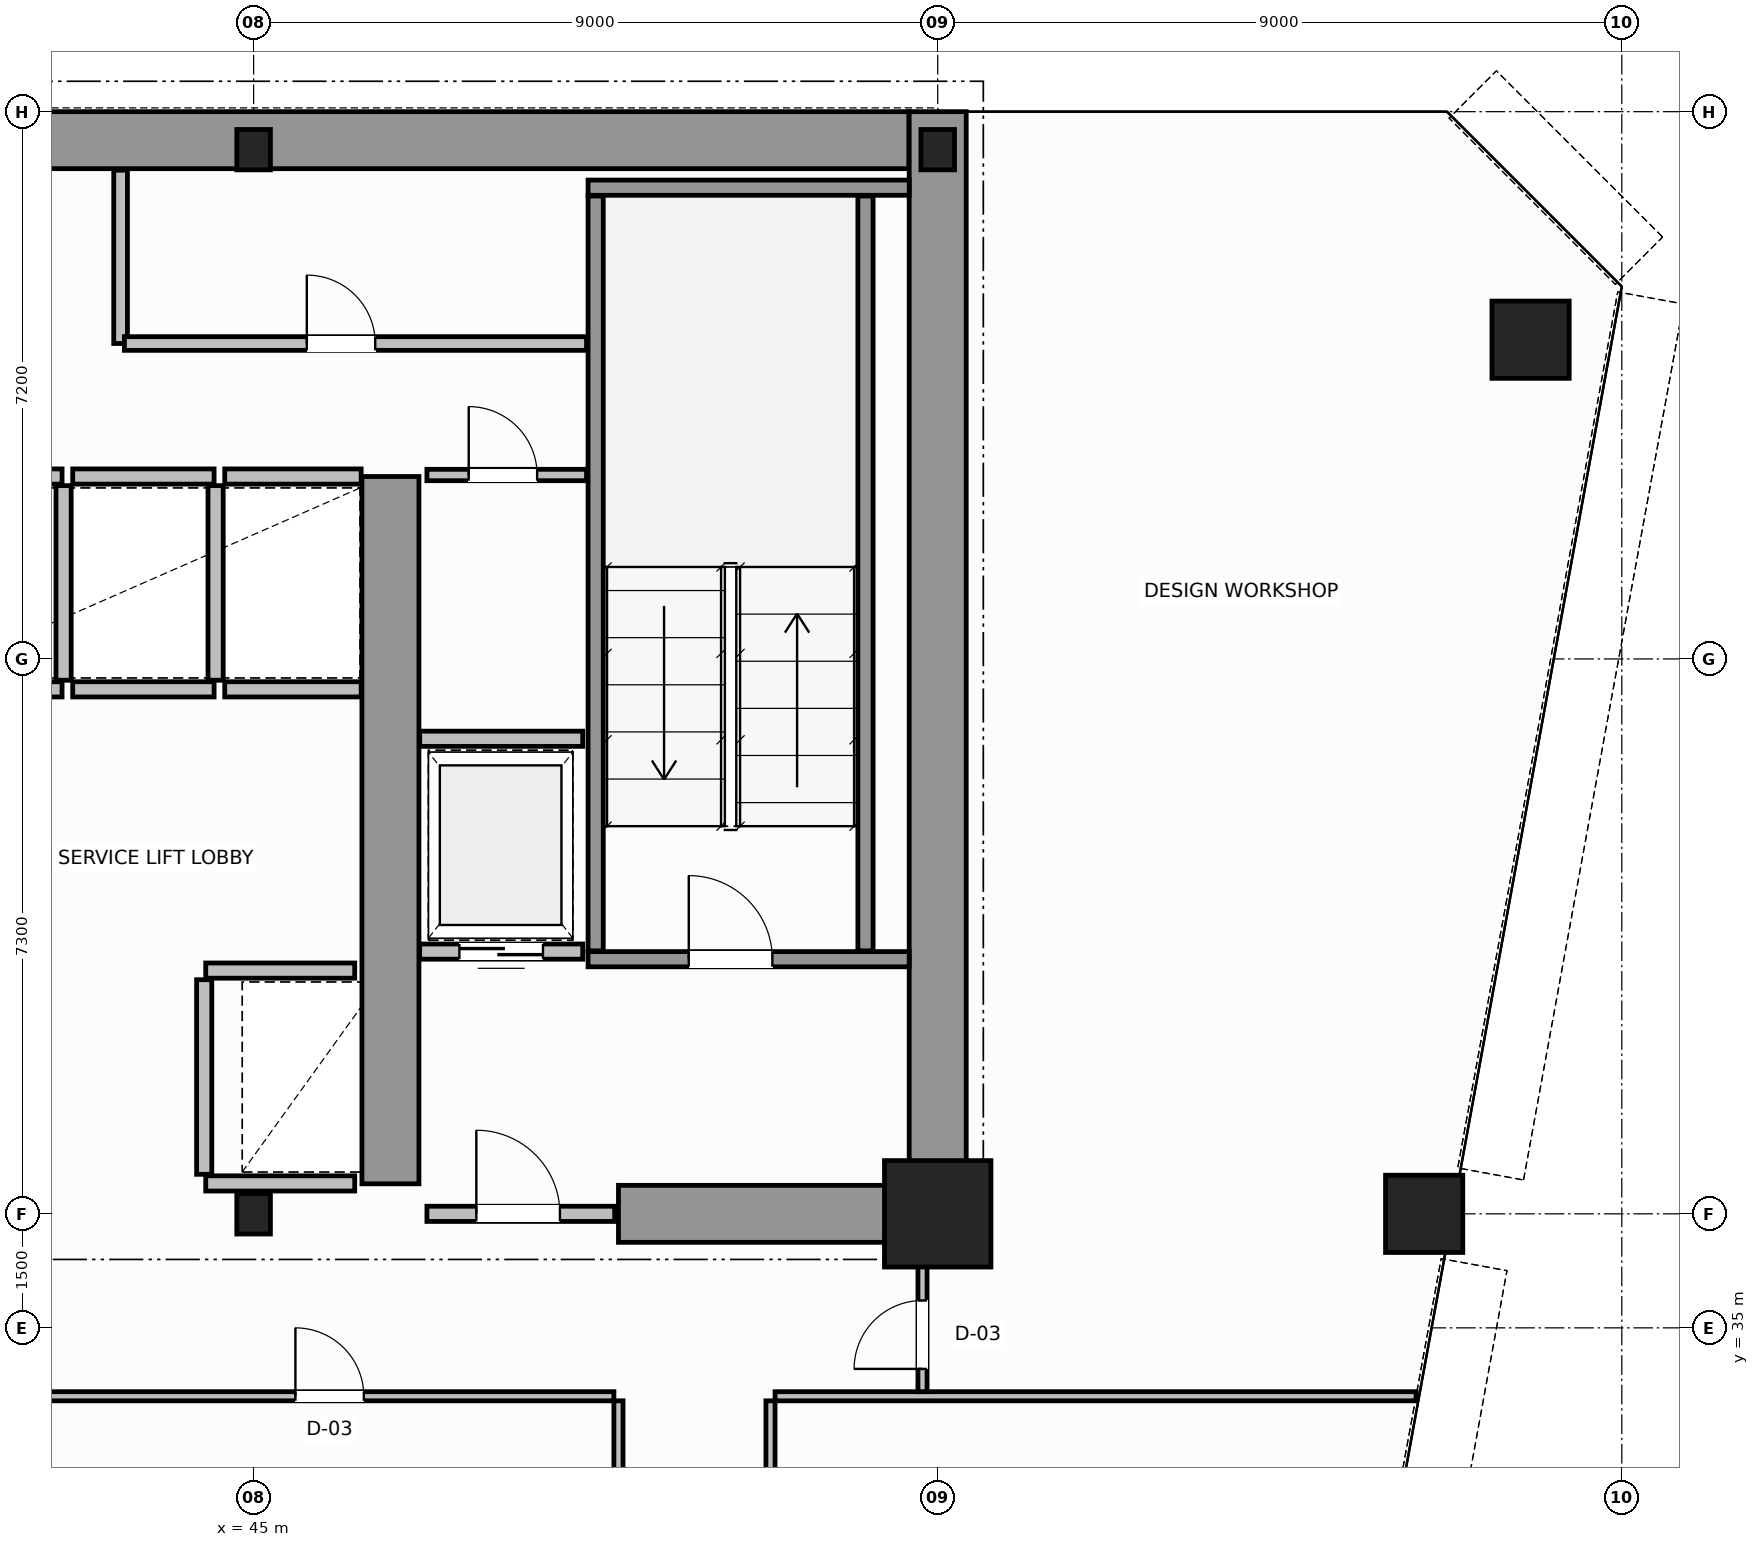
"""IFC4 building model, lengths in metres.
Left out: names, types, materials, properties, quantities, classifications, styles, units other than length and angle.
Written with IfcOpenShell. Run it as: python <this file> out.ifc"""

import sys

from ifc_helpers import new_model, si_unit, direction, frame, frame_2d, origin, origin_2d, place, context, subcontext, project, spatial, rectangle, hollow_circle, i_section, extrude, source, transform, mapped, element, fill, save


model = new_model("IFC4")
c1 = context("Model", 3, precision=1e-05, world=origin(), true_north=direction((0.0, 1.0)))
c2 = subcontext(c1, "Body", "Model", "MODEL_VIEW")
j1 = project(units=[si_unit("LENGTHUNIT", "METRE"), si_unit("PLANEANGLEUNIT", "RADIAN")], contexts=[c1])
p1 = place(None, origin())
s1 = spatial("IfcSite", under=j1, at=p1, CompositionType="ELEMENT")
p2 = place(p1, origin())
s2 = spatial("IfcBuilding", under=s1, at=p2, CompositionType="ELEMENT")
p3 = place(p2, frame((0.0, 0.0, 92.0)))
s3 = spatial("IfcBuildingStorey", under=s2, at=p3, CompositionType="ELEMENT", Elevation=92.0)
m1 = source(origin(), c2, "Body", "SweptSolid", [
    extrude(i_section(OverallWidth=0.442, OverallDepth=0.531, WebThickness=0.065, FlangeThickness=0.076, FilletRadius=0.015, at=origin_2d()), origin(), (0.0, 0.0, 1.0), 3.8),
])
p4 = place(p3, frame((45.0, 36.5, 0.0), z_axis=(0.0, 0.0, 1.0), x_axis=(1.0, 0.0, 0.0)))
e1 = element("IfcColumn", 1, at=p4, inside=s3, PredefinedType="COLUMN", context=c2, shape_type="MappedRepresentation", body=[
    mapped(m1, transform((0.0, 0.0, 0.0), scale=1.0)),
])
m2 = source(origin(), c2, "Body", "SweptSolid", [
    extrude(rectangle(XDim=1.4, YDim=1.4, at=origin_2d()), origin(), (0.0, 0.0, 1.0), 3.8),
])
p5 = place(p3, frame((54.0, 36.5, 0.0), z_axis=(0.0, 0.0, 1.0), x_axis=(1.0, 0.0, 0.0)))
e2 = element("IfcColumn", 2, at=p5, inside=s3, PredefinedType="COLUMN", context=c2, shape_type="MappedRepresentation", body=[
    mapped(m2, transform((0.0, 0.0, 0.0), scale=1.0)),
])
for number, where, z_axis, x_axis in (
    (3, (45.0, 50.5, 0.0), (0.0, 0.0, 1.0), (1.0, 0.0, 0.0)),
    (4, (54.0, 50.5, 0.0), (0.0, 0.0, 1.0), (1.0, 0.0, 0.0)),
):
    element("IfcColumn", number, at=place(p3, frame(where, z_axis=z_axis, x_axis=x_axis)), inside=s3, PredefinedType="COLUMN", context=c2, shape_type="MappedRepresentation", body=[
        mapped(m1, transform((0.0, 0.0, 0.0), scale=1.0)),
    ])
m3 = source(origin(), c2, "Body", "SweptSolid", [
    extrude(hollow_circle(Radius=0.508, WallThickness=0.045, at=origin_2d()), origin(), (0.0, 0.0, 1.0), 3.8),
])
for number, where, z_axis, x_axis in (
    (5, (61.8, 48.0, 0.0), (0.0, 0.0, 1.0), (1.0, 0.0, 0.0)),
    (6, (60.4, 36.5, 0.0), (0.0, 0.0, 1.0), (1.0, 0.0, 0.0)),
):
    element("IfcColumn", number, at=place(p3, frame(where, z_axis=z_axis, x_axis=x_axis)), inside=s3, PredefinedType="COLUMN", context=c2, shape_type="MappedRepresentation", body=[
        mapped(m3, transform((0.0, 0.0, 0.0), scale=1.0)),
    ])
p6 = place(p3, frame((34.002, 50.625, 0.0), z_axis=(0.0, 0.0, 1.0), x_axis=(1.0, 0.0, 0.0)))
e7 = element("IfcWall", 7, at=p6, inside=s3, PredefinedType="SHEAR", context=c2, shape_type="SweptSolid", body=[
    extrude(rectangle(XDim=19.619, YDim=0.75, at=frame_2d((9.81, 0.0))), origin(), (0.0, 0.0, 1.0), 3.8),
])
p7 = place(p3, frame((54.0, 36.5, 0.0), z_axis=(0.0, 0.0, 1.0), x_axis=(0.0, 1.0, 0.0)))
e8 = element("IfcWall", 8, at=p7, inside=s3, PredefinedType="SHEAR", context=c2, shape_type="SweptSolid", body=[
    extrude(rectangle(XDim=14.5, YDim=0.75, at=frame_2d((7.25, 0.0))), origin(), (0.0, 0.0, 1.0), 3.8),
])
p8 = place(p3, frame((49.8, 36.5, 0.0), z_axis=(0.0, 0.0, 1.0), x_axis=(1.0, 0.0, 0.0)))
e9 = element("IfcWall", 9, at=p8, inside=s3, PredefinedType="SHEAR", context=c2, shape_type="SweptSolid", body=[
    extrude(rectangle(XDim=3.805, YDim=0.75, at=frame_2d((1.902, 0.0))), origin(), (0.0, 0.0, 1.0), 2.38),
])
p9 = place(p3, frame((46.8, 36.895, 0.0), z_axis=(0.0, 0.0, 1.0), x_axis=(0.0, 1.0, 0.0)))
e10 = element("IfcWall", 10, at=p9, inside=s3, PredefinedType="SHEAR", context=c2, shape_type="SweptSolid", body=[
    extrude(rectangle(XDim=9.305, YDim=0.75, at=frame_2d((4.652, 0.0))), origin(), (0.0, 0.0, 1.0), 3.8),
])
p10 = place(p3, frame((49.4, 39.85, 0.0), z_axis=(0.0, 0.0, 1.0), x_axis=(1.0, 0.0, 0.0)))
e11 = element("IfcWall", 11, at=p10, inside=s3, PredefinedType="SOLIDWALL", context=c2, shape_type="SweptSolid", body=[
    extrude(rectangle(XDim=4.225, YDim=0.2, at=frame_2d((2.113, 0.0))), origin(), (0.0, 0.0, 1.0), 3.8),
])
p11 = place(p10, frame((1.325, 0.0, 0.0)))
e12 = element("IfcOpeningElement", 12, at=p11, cuts=e11, PredefinedType="OPENING", context=c2, shape_type="SweptSolid", body=[
    extrude(rectangle(XDim=1.1, YDim=2.15, at=frame_2d((0.55, 1.075))), frame((0.0, 0.11, 0.0), z_axis=(0.0, -1.0, 0.0), x_axis=(1.0, 0.0, 0.0)), (0.0, 0.0, 1.0), 0.22),
])
p12 = place(p3, frame((49.4, 50.0, 0.0), z_axis=(0.0, 0.0, 1.0), x_axis=(1.0, 0.0, 0.0)))
e13 = element("IfcWall", 13, at=p12, inside=s3, PredefinedType="SOLIDWALL", context=c2, shape_type="SweptSolid", body=[
    extrude(rectangle(XDim=4.225, YDim=0.2, at=frame_2d((2.113, 0.0))), origin(), (0.0, 0.0, 1.0), 3.8),
])
for number, where, z_axis, x_axis in (
    (14, (49.5, 39.96, 0.0), (0.0, 0.0, 1.0), (0.0, 1.0, 0.0)),
    (15, (53.05, 39.96, 0.0), (0.0, 0.0, 1.0), (0.0, 1.0, 0.0)),
):
    element("IfcWall", number, at=place(p3, frame(where, z_axis=z_axis, x_axis=x_axis)), inside=s3, PredefinedType="SOLIDWALL", context=c2, shape_type="SweptSolid", body=[
        extrude(rectangle(XDim=9.93, YDim=0.2, at=frame_2d((4.965, 0.0))), origin(), (0.0, 0.0, 1.0), 3.8),
    ])
p13 = place(p3, frame((47.28, 36.5, 0.0), z_axis=(0.0, 0.0, 1.0), x_axis=(1.0, 0.0, 0.0)))
e16 = element("IfcWall", 16, at=p13, inside=s3, PredefinedType="SOLIDWALL", context=c2, shape_type="SweptSolid", body=[
    extrude(rectangle(XDim=2.47, YDim=0.2, at=frame_2d((1.235, 0.0))), origin(), (0.0, 0.0, 1.0), 2.37),
])
p14 = place(p13, frame((0.65, 0.0, 0.0)))
e17 = element("IfcOpeningElement", 17, at=p14, cuts=e16, PredefinedType="OPENING", context=c2, shape_type="SweptSolid", body=[
    extrude(rectangle(XDim=1.1, YDim=2.15, at=frame_2d((0.55, 1.075))), frame((0.0, 0.11, 0.0), z_axis=(0.0, -1.0, 0.0), x_axis=(1.0, 0.0, 0.0)), (0.0, 0.0, 1.0), 0.22),
])
p15 = place(p3, frame((44.37, 39.7, 0.0), z_axis=(0.0, 0.0, 1.0), x_axis=(1.0, 0.0, 0.0)))
e18 = element("IfcWall", 18, at=p15, inside=s3, PredefinedType="SOLIDWALL", context=c2, shape_type="SweptSolid", body=[
    extrude(rectangle(XDim=1.96, YDim=0.2, at=frame_2d((0.98, 0.0))), origin(), (0.0, 0.0, 1.0), 3.58),
])
p16 = place(p3, frame((44.37, 36.9, 0.0), z_axis=(0.0, 0.0, 1.0), x_axis=(1.0, 0.0, 0.0)))
e19 = element("IfcWall", 19, at=p16, inside=s3, PredefinedType="SOLIDWALL", context=c2, shape_type="SweptSolid", body=[
    extrude(rectangle(XDim=1.96, YDim=0.2, at=frame_2d((0.98, 0.0))), origin(), (0.0, 0.0, 1.0), 2.37),
])
p17 = place(p3, frame((44.35, 37.02, 0.0), z_axis=(0.0, 0.0, 1.0), x_axis=(0.0, 1.0, 0.0)))
e20 = element("IfcWall", 20, at=p17, inside=s3, PredefinedType="SOLIDWALL", context=c2, shape_type="SweptSolid", body=[
    extrude(rectangle(XDim=2.56, YDim=0.2, at=frame_2d((1.28, 0.0))), origin(), (0.0, 0.0, 1.0), 3.58),
])
for number, where, z_axis, x_axis in (
    (21, (40.62, 43.4, 0.0), (0.0, 0.0, 1.0), (1.0, 0.0, 0.0)),
    (22, (40.62, 46.2, 0.0), (0.0, 0.0, 1.0), (1.0, 0.0, 0.0)),
):
    element("IfcWall", number, at=place(p3, frame(where, z_axis=z_axis, x_axis=x_axis)), inside=s3, PredefinedType="SOLIDWALL", context=c2, shape_type="SweptSolid", body=[
        extrude(rectangle(XDim=1.86, YDim=0.2, at=frame_2d((0.93, 0.0))), origin(), (0.0, 0.0, 1.0), 3.58),
    ])
p18 = place(p3, frame((42.5, 43.52, 0.0), z_axis=(0.0, 0.0, 1.0), x_axis=(0.0, 1.0, 0.0)))
e23 = element("IfcWall", 23, at=p18, inside=s3, PredefinedType="SOLIDWALL", context=c2, shape_type="SweptSolid", body=[
    extrude(rectangle(XDim=2.56, YDim=0.2, at=frame_2d((1.28, 0.0))), origin(), (0.0, 0.0, 1.0), 3.58),
])
for number, where, z_axis, x_axis in (
    (24, (42.62, 43.4, 0.0), (0.0, 0.0, 1.0), (1.0, 0.0, 0.0)),
    (25, (42.62, 46.2, 0.0), (0.0, 0.0, 1.0), (1.0, 0.0, 0.0)),
):
    element("IfcWall", number, at=place(p3, frame(where, z_axis=z_axis, x_axis=x_axis)), inside=s3, PredefinedType="SOLIDWALL", context=c2, shape_type="SweptSolid", body=[
        extrude(rectangle(XDim=1.86, YDim=0.2, at=frame_2d((0.93, 0.0))), origin(), (0.0, 0.0, 1.0), 3.58),
    ])
p19 = place(p3, frame((44.5, 43.52, 0.0), z_axis=(0.0, 0.0, 1.0), x_axis=(0.0, 1.0, 0.0)))
e26 = element("IfcWall", 26, at=p19, inside=s3, PredefinedType="SOLIDWALL", context=c2, shape_type="SweptSolid", body=[
    extrude(rectangle(XDim=2.56, YDim=0.2, at=frame_2d((1.28, 0.0))), origin(), (0.0, 0.0, 1.0), 3.58),
])
for number, where, z_axis, x_axis in (
    (27, (44.62, 43.4, 0.0), (0.0, 0.0, 1.0), (1.0, 0.0, 0.0)),
    (28, (44.62, 46.2, 0.0), (0.0, 0.0, 1.0), (1.0, 0.0, 0.0)),
):
    element("IfcWall", number, at=place(p3, frame(where, z_axis=z_axis, x_axis=x_axis)), inside=s3, PredefinedType="SOLIDWALL", context=c2, shape_type="SweptSolid", body=[
        extrude(rectangle(XDim=1.795, YDim=0.2, at=frame_2d((0.897, 0.0))), origin(), (0.0, 0.0, 1.0), 3.58),
    ])
p20 = place(p3, frame((47.185, 39.95, 0.0), z_axis=(0.0, 0.0, 1.0), x_axis=(1.0, 0.0, 0.0)))
e29 = element("IfcWall", 29, at=p20, inside=s3, PredefinedType="SOLIDWALL", context=c2, shape_type="SweptSolid", body=[
    extrude(rectangle(XDim=2.145, YDim=0.2, at=frame_2d((1.073, 0.0))), origin(), (0.0, 0.0, 1.0), 3.58),
])
p21 = place(p20, frame((0.522, 0.0, 0.0)))
e30 = element("IfcOpeningElement", 30, at=p21, cuts=e29, PredefinedType="OPENING", context=c2, shape_type="SweptSolid", body=[
    extrude(rectangle(XDim=1.1, YDim=2.15, at=frame_2d((0.55, 1.075))), frame((0.0, 0.11, 0.0), z_axis=(0.0, -1.0, 0.0), x_axis=(1.0, 0.0, 0.0)), (0.0, 0.0, 1.0), 0.22),
])
p22 = place(p3, frame((47.185, 42.75, 0.0), z_axis=(0.0, 0.0, 1.0), x_axis=(1.0, 0.0, 0.0)))
e31 = element("IfcWall", 31, at=p22, inside=s3, PredefinedType="SOLIDWALL", context=c2, shape_type="SweptSolid", body=[
    extrude(rectangle(XDim=2.145, YDim=0.2, at=frame_2d((1.073, 0.0))), origin(), (0.0, 0.0, 1.0), 3.58),
])
p23 = place(p3, frame((47.28, 46.22, 0.0), z_axis=(0.0, 0.0, 1.0), x_axis=(1.0, 0.0, 0.0)))
e32 = element("IfcWall", 32, at=p23, inside=s3, PredefinedType="PARTITIONING", context=c2, shape_type="SweptSolid", body=[
    extrude(rectangle(XDim=2.1, YDim=0.15, at=frame_2d((1.05, 0.0))), origin(), (0.0, 0.0, 1.0), 3.58),
])
p24 = place(p23, frame((0.55, 0.0, 0.0)))
e33 = element("IfcOpeningElement", 33, at=p24, cuts=e32, PredefinedType="OPENING", context=c2, shape_type="SweptSolid", body=[
    extrude(rectangle(XDim=0.9, YDim=2.1, at=frame_2d((0.45, 1.05))), frame((0.0, 0.085, 0.0), z_axis=(0.0, -1.0, 0.0), x_axis=(1.0, 0.0, 0.0)), (0.0, 0.0, 1.0), 0.17),
])
p25 = place(p3, frame((43.25, 47.95, 0.0), z_axis=(0.0, 0.0, 1.0), x_axis=(0.0, 1.0, 0.0)))
e34 = element("IfcWall", 34, at=p25, inside=s3, PredefinedType="PLUMBINGWALL", context=c2, shape_type="SweptSolid", body=[
    extrude(rectangle(XDim=2.28, YDim=0.18, at=frame_2d((1.14, 0.0))), origin(), (0.0, 0.0, 1.0), 3.58),
])
p26 = place(p3, frame((43.3, 47.95, 0.0), z_axis=(0.0, 0.0, 1.0), x_axis=(1.0, 0.0, 0.0)))
e35 = element("IfcWall", 35, at=p26, inside=s3, PredefinedType="PLUMBINGWALL", context=c2, shape_type="SweptSolid", body=[
    extrude(rectangle(XDim=6.08, YDim=0.18, at=frame_2d((3.04, 0.0))), origin(), (0.0, 0.0, 1.0), 3.58),
])
p27 = place(p26, frame((2.4, 0.0, 0.0)))
e36 = element("IfcOpeningElement", 36, at=p27, cuts=e35, PredefinedType="OPENING", context=c2, shape_type="SweptSolid", body=[
    extrude(rectangle(XDim=0.9, YDim=2.15, at=frame_2d((0.45, 1.075))), frame((0.0, 0.1, 0.0), z_axis=(0.0, -1.0, 0.0), x_axis=(1.0, 0.0, 0.0)), (0.0, 0.0, 1.0), 0.2),
])
p28 = place(p3, frame((18.26, 34.1, 0.0), z_axis=(0.0, 0.0, 1.0), x_axis=(1.0, 0.0, 0.0)))
e37 = element("IfcWall", 37, at=p28, inside=s3, PredefinedType="PARTITIONING", context=c2, shape_type="SweptSolid", body=[
    extrude(rectangle(XDim=31.48, YDim=0.12, at=frame_2d((15.74, 0.0))), origin(), (0.0, 0.0, 1.0), 3.58),
])
p29 = place(p28, frame((2.59, 0.0, 0.0)))
e38 = element("IfcOpeningElement", 38, at=p29, cuts=e37, PredefinedType="OPENING", context=c2, shape_type="SweptSolid", body=[
    extrude(rectangle(XDim=0.9, YDim=2.15, at=frame_2d((0.45, 1.075))), frame((0.0, 0.07, 0.0), z_axis=(0.0, -1.0, 0.0), x_axis=(1.0, 0.0, 0.0)), (0.0, 0.0, 1.0), 0.14),
])
p30 = place(p28, frame((9.89, 0.0, 0.0)))
e39 = element("IfcOpeningElement", 39, at=p30, cuts=e37, PredefinedType="OPENING", context=c2, shape_type="SweptSolid", body=[
    extrude(rectangle(XDim=0.9, YDim=2.15, at=frame_2d((0.45, 1.075))), frame((0.0, 0.07, 0.0), z_axis=(0.0, -1.0, 0.0), x_axis=(1.0, 0.0, 0.0)), (0.0, 0.0, 1.0), 0.14),
])
p31 = place(p28, frame((18.79, 0.0, 0.0)))
e40 = element("IfcOpeningElement", 40, at=p31, cuts=e37, PredefinedType="OPENING", context=c2, shape_type="SweptSolid", body=[
    extrude(rectangle(XDim=0.9, YDim=2.15, at=frame_2d((0.45, 1.075))), frame((0.0, 0.07, 0.0), z_axis=(0.0, -1.0, 0.0), x_axis=(1.0, 0.0, 0.0)), (0.0, 0.0, 1.0), 0.14),
])
p32 = place(p28, frame((27.29, 0.0, 0.0)))
e41 = element("IfcOpeningElement", 41, at=p32, cuts=e37, PredefinedType="OPENING", context=c2, shape_type="SweptSolid", body=[
    extrude(rectangle(XDim=0.9, YDim=2.15, at=frame_2d((0.45, 1.075))), frame((0.0, 0.07, 0.0), z_axis=(0.0, -1.0, 0.0), x_axis=(1.0, 0.0, 0.0)), (0.0, 0.0, 1.0), 0.14),
])
p33 = place(p3, frame((51.86, 34.1, 0.0), z_axis=(0.0, 0.0, 1.0), x_axis=(1.0, 0.0, 0.0)))
e42 = element("IfcWall", 42, at=p33, inside=s3, PredefinedType="PARTITIONING", context=c2, shape_type="SweptSolid", body=[
    extrude(rectangle(XDim=8.434, YDim=0.12, at=frame_2d((4.217, 0.0))), origin(), (0.0, 0.0, 1.0), 3.58),
])
p34 = place(p3, frame((53.8, 34.16, 0.0), z_axis=(0.0, 0.0, 1.0), x_axis=(0.0, 1.0, 0.0)))
e43 = element("IfcWall", 43, at=p34, inside=s3, PredefinedType="PARTITIONING", context=c2, shape_type="SweptSolid", body=[
    extrude(rectangle(XDim=2.28, YDim=0.12, at=frame_2d((1.14, 0.0))), origin(), (0.0, 0.0, 1.0), 3.58),
])
p35 = place(p34, frame((0.3, 0.0, 0.0)))
e44 = element("IfcOpeningElement", 44, at=p35, cuts=e43, PredefinedType="OPENING", context=c2, shape_type="SweptSolid", body=[
    extrude(rectangle(XDim=0.9, YDim=2.15, at=frame_2d((0.45, 1.075))), frame((0.0, 0.07, 0.0), z_axis=(0.0, -1.0, 0.0), x_axis=(1.0, 0.0, 0.0)), (0.0, 0.0, 1.0), 0.14),
])
p36 = place(p3, frame((49.8, 18.2, 0.0), z_axis=(0.0, 0.0, 1.0), x_axis=(0.0, 1.0, 0.0)))
e45 = element("IfcWall", 45, at=p36, inside=s3, PredefinedType="PARTITIONING", context=c2, shape_type="SweptSolid", body=[
    extrude(rectangle(XDim=15.84, YDim=0.12, at=frame_2d((7.92, 0.0))), origin(), (0.0, 0.0, 1.0), 3.58),
])
p37 = place(p3, frame((51.8, 18.2, 0.0), z_axis=(0.0, 0.0, 1.0), x_axis=(0.0, 1.0, 0.0)))
e46 = element("IfcWall", 46, at=p37, inside=s3, PredefinedType="PARTITIONING", context=c2, shape_type="SweptSolid", body=[
    extrude(rectangle(XDim=15.84, YDim=0.12, at=frame_2d((7.92, 0.0))), origin(), (0.0, 0.0, 1.0), 3.58),
])
p38 = place(p37, frame((4.15, 0.0, 0.0)))
e47 = element("IfcOpeningElement", 47, at=p38, cuts=e46, PredefinedType="OPENING", context=c2, shape_type="SweptSolid", body=[
    extrude(rectangle(XDim=0.9, YDim=2.15, at=frame_2d((0.45, 1.075))), frame((0.0, 0.07, 0.0), z_axis=(0.0, -1.0, 0.0), x_axis=(1.0, 0.0, 0.0)), (0.0, 0.0, 1.0), 0.14),
])
p39 = place(p37, frame((12.07, 0.0, 0.0)))
e48 = element("IfcOpeningElement", 48, at=p39, cuts=e46, PredefinedType="OPENING", context=c2, shape_type="SweptSolid", body=[
    extrude(rectangle(XDim=0.9, YDim=2.15, at=frame_2d((0.45, 1.075))), frame((0.0, 0.07, 0.0), z_axis=(0.0, -1.0, 0.0), x_axis=(1.0, 0.0, 0.0)), (0.0, 0.0, 1.0), 0.14),
])
m4 = source(origin(), c2, "Body", "SweptSolid", [
    extrude(rectangle(XDim=1.1, YDim=2.15, at=frame_2d((0.55, 1.075))), frame((0.0, 0.025, 0.0), z_axis=(0.0, -1.0, 0.0), x_axis=(1.0, 0.0, 0.0)), (0.0, 0.0, 1.0), 0.05),
])
p40 = place(p11, origin())
e49 = element("IfcDoor", 49, at=p40, inside=s3, OperationType="SINGLE_SWING_RIGHT", PredefinedType="DOOR", context=c2, shape_type="MappedRepresentation", body=[
    mapped(m4, transform((0.0, 0.0, 0.0), scale=1.0)),
])
fill(e12, e49)
p41 = place(p14, origin())
e50 = element("IfcDoor", 50, at=p41, inside=s3, OperationType="SINGLE_SWING_LEFT", PredefinedType="DOOR", context=c2, shape_type="MappedRepresentation", body=[
    mapped(m4, transform((0.0, 0.0, 0.0), scale=1.0)),
])
fill(e17, e50)
p42 = place(p21, origin())
e51 = element("IfcDoor", 51, at=p42, inside=s3, OperationType="DOUBLE_DOOR_SLIDING", PredefinedType="DOOR", context=c2, shape_type="MappedRepresentation", body=[
    mapped(m4, transform((0.0, 0.0, 0.0), scale=1.0)),
])
fill(e30, e51)
m5 = source(origin(), c2, "Body", "SweptSolid", [
    extrude(rectangle(XDim=0.9, YDim=2.1, at=frame_2d((0.45, 1.05))), frame((0.0, 0.025, 0.0), z_axis=(0.0, -1.0, 0.0), x_axis=(1.0, 0.0, 0.0)), (0.0, 0.0, 1.0), 0.05),
])
p43 = place(p24, origin())
e52 = element("IfcDoor", 52, at=p43, inside=s3, OperationType="SINGLE_SWING_RIGHT", PredefinedType="DOOR", context=c2, shape_type="MappedRepresentation", body=[
    mapped(m5, transform((0.0, 0.0, 0.0), scale=1.0)),
])
fill(e33, e52)
m6 = source(origin(), c2, "Body", "SweptSolid", [
    extrude(rectangle(XDim=0.9, YDim=2.15, at=frame_2d((0.45, 1.075))), frame((0.0, 0.025, 0.0), z_axis=(0.0, -1.0, 0.0), x_axis=(1.0, 0.0, 0.0)), (0.0, 0.0, 1.0), 0.05),
])
p44 = place(p27, origin())
e53 = element("IfcDoor", 53, at=p44, inside=s3, OperationType="SINGLE_SWING_RIGHT", PredefinedType="DOOR", context=c2, shape_type="MappedRepresentation", body=[
    mapped(m6, transform((0.0, 0.0, 0.0), scale=1.0)),
])
fill(e36, e53)
p45 = place(p35, origin())
e54 = element("IfcDoor", 54, at=p45, inside=s3, OperationType="SINGLE_SWING_RIGHT", PredefinedType="DOOR", context=c2, shape_type="MappedRepresentation", body=[
    mapped(m6, transform((0.0, 0.0, 0.0), scale=1.0)),
])
fill(e44, e54)
p46 = place(p32, origin())
e55 = element("IfcDoor", 55, at=p46, inside=s3, OperationType="SINGLE_SWING_RIGHT", PredefinedType="DOOR", context=c2, shape_type="MappedRepresentation", body=[
    mapped(m6, transform((0.0, 0.0, 0.0), scale=1.0)),
])
fill(e41, e55)
save(model, sys.argv[1])
